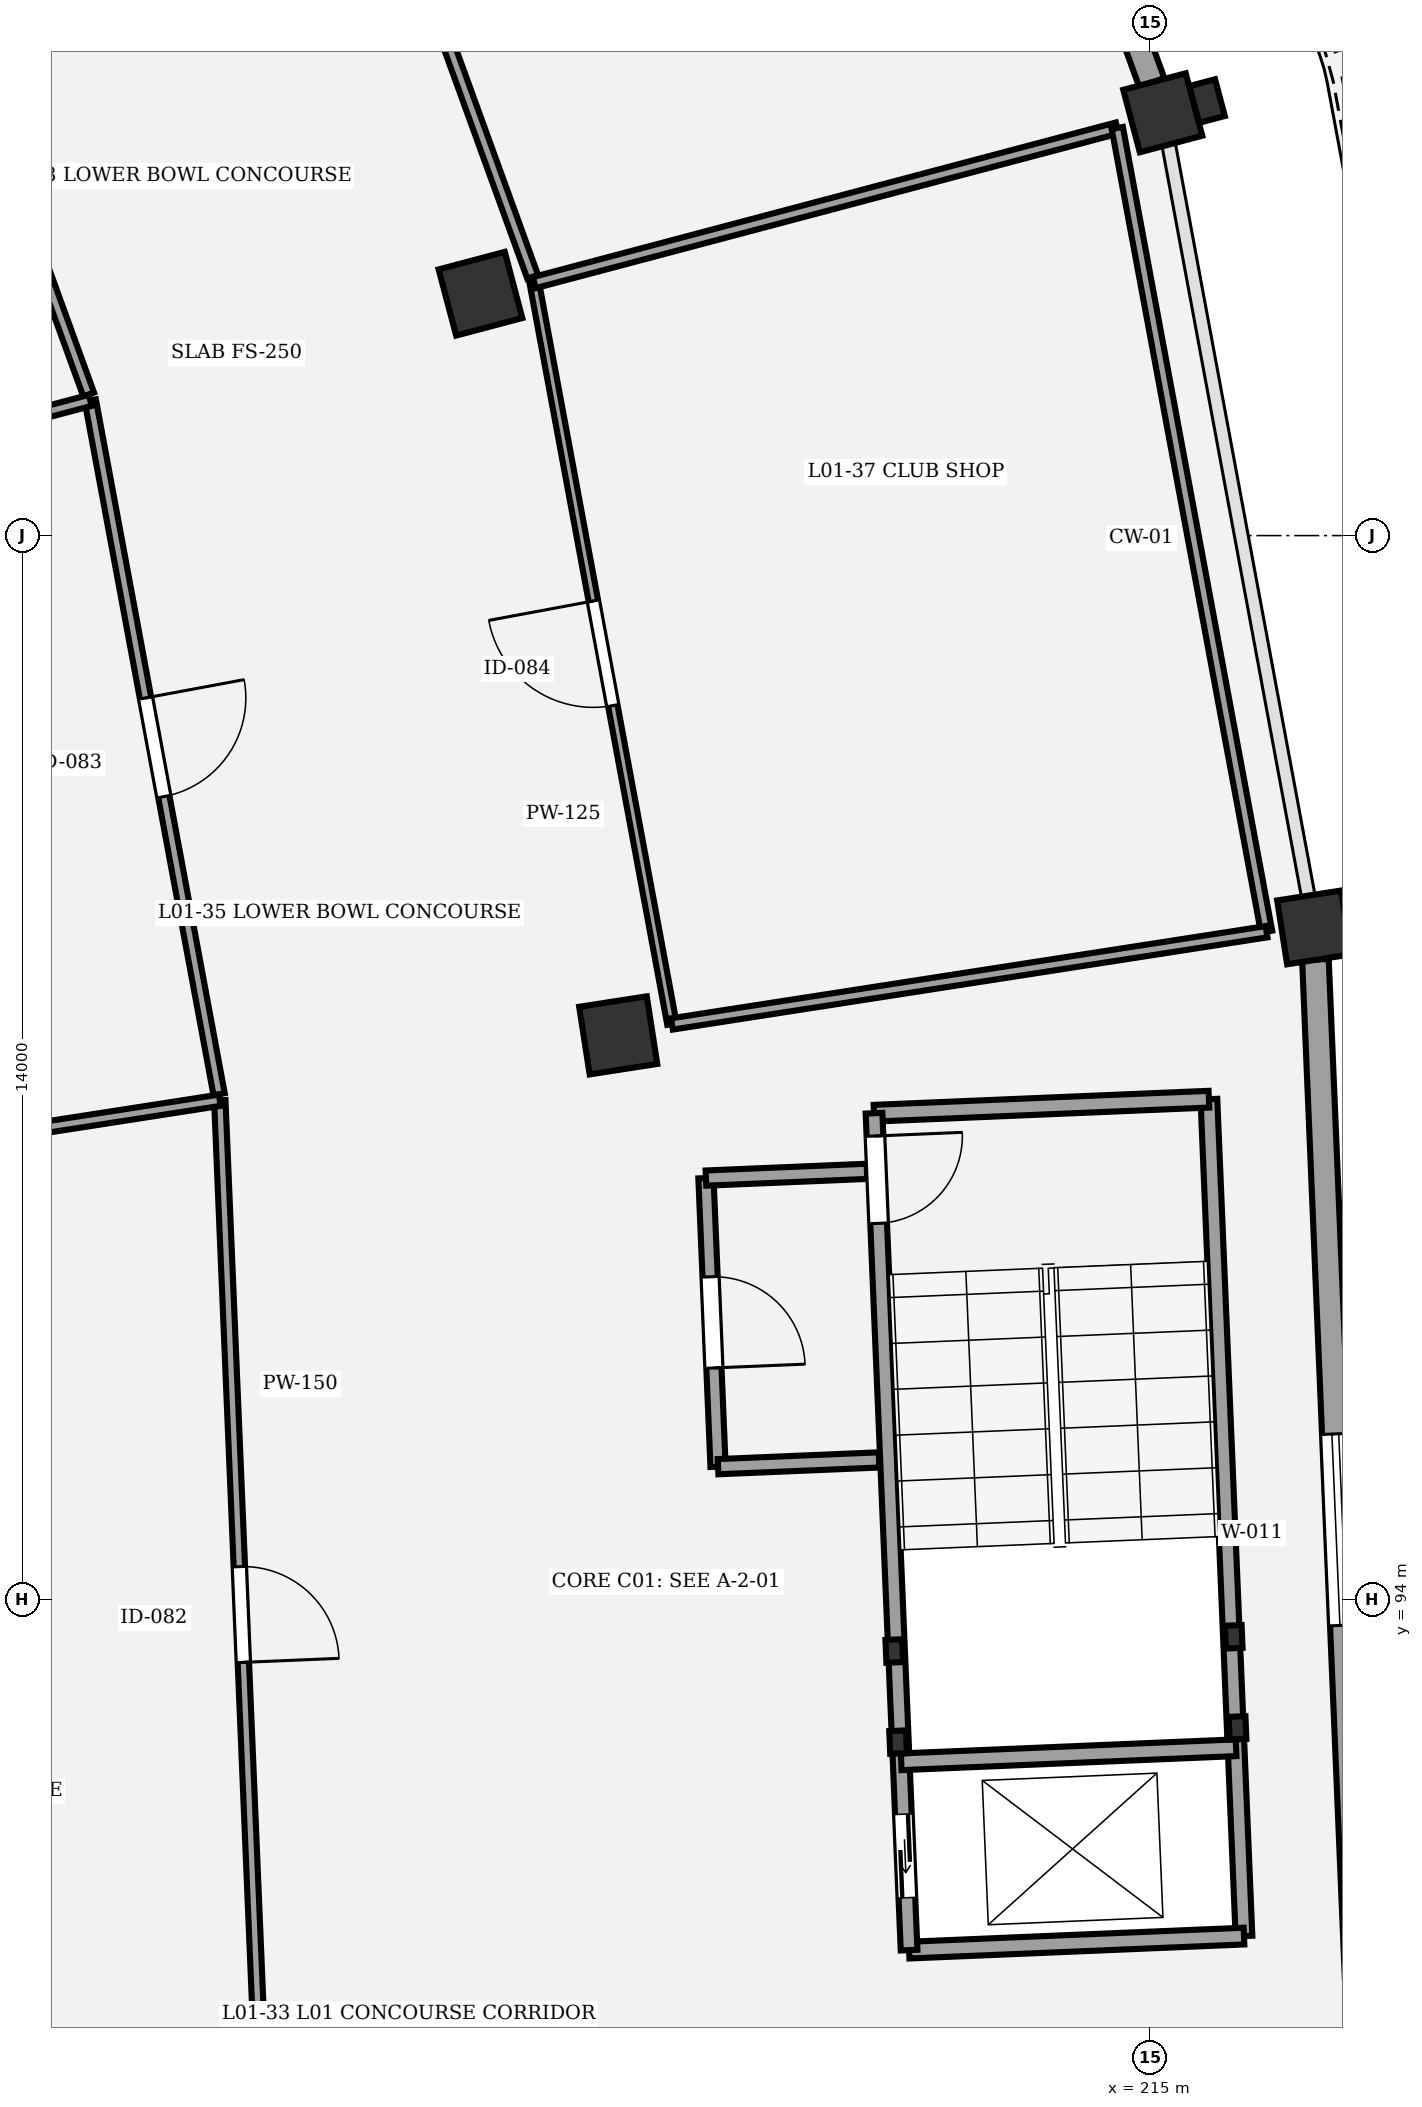
"""IFC4 building model, lengths in metres.
Left out: names, types, materials, properties, quantities, classifications, styles, units other than length and angle.
Written with IfcOpenShell. Run it as: python <this file> out.ifc"""

import sys

from ifc_helpers import new_model, si_unit, direction, frame, frame_2d, origin, origin_2d, place, context, subcontext, project, spatial, rectangle, extrude, element, fill, save


model = new_model("IFC4")
c1 = context("Model", 3, precision=1e-05, world=origin(), true_north=direction((0.0, 1.0)))
c2 = subcontext(c1, "Body", "Model", "MODEL_VIEW")
j1 = project(units=[si_unit("LENGTHUNIT", "METRE"), si_unit("PLANEANGLEUNIT", "RADIAN")], contexts=[c1])
p1 = place(None, origin())
s1 = spatial("IfcSite", under=j1, at=p1, CompositionType="ELEMENT")
p2 = place(p1, origin())
s2 = spatial("IfcBuilding", under=s1, at=p2, CompositionType="ELEMENT")
p3 = place(p2, frame((0.0, 0.0, 5.4)))
s3 = spatial("IfcBuildingStorey", under=s2, at=p3, CompositionType="ELEMENT", Elevation=5.4)
p4 = place(p3, frame((208.0, 101.425, 0.0), z_axis=(0.0, 0.0, 1.0), x_axis=(0.98817491911, 0.153330783737, 0.0)))
e1 = element("IfcColumn", 1, at=p4, inside=s3, PredefinedType="COLUMN", context=c2, shape_type="SweptSolid", body=[
    extrude(rectangle(XDim=0.9, YDim=0.9, at=origin_2d()), origin(), (0.0, 0.0, 1.0), 4.8),
])
p5 = place(p3, frame((217.156, 102.845, 0.0), z_axis=(0.0, 0.0, 1.0), x_axis=(0.98817491911, 0.153330783737, 0.0)))
e2 = element("IfcColumn", 2, at=p5, inside=s3, PredefinedType="COLUMN", context=c2, shape_type="SweptSolid", body=[
    extrude(rectangle(XDim=0.85, YDim=0.85, at=origin_2d()), origin(), (0.0, 0.0, 1.0), 4.8),
])
p6 = place(p3, frame((206.188, 111.182, 0.0), z_axis=(0.0, 0.0, 1.0), x_axis=(0.966600102017, 0.256289373133, 0.0)))
e3 = element("IfcColumn", 3, at=p6, inside=s3, PredefinedType="COLUMN", context=c2, shape_type="SweptSolid", body=[
    extrude(rectangle(XDim=0.9, YDim=0.9, at=origin_2d()), origin(), (0.0, 0.0, 1.0), 4.8),
])
p7 = place(p3, frame((215.165, 113.562, 0.0), z_axis=(0.0, 0.0, 1.0), x_axis=(0.966600102017, 0.256289373133, 0.0)))
e4 = element("IfcColumn", 4, at=p7, inside=s3, PredefinedType="COLUMN", context=c2, shape_type="SweptSolid", body=[
    extrude(rectangle(XDim=0.85, YDim=0.85, at=origin_2d()), origin(), (0.0, 0.0, 1.0), 4.8),
])
p8 = place(p3, frame((215.748, 113.717, 0.0), z_axis=(0.0, 0.0, 1.0), x_axis=(-0.256289373133, 0.966600102017, 0.0)))
e5 = element("IfcColumn", 5, at=p8, inside=s3, PredefinedType="PILASTER", context=c2, shape_type="SweptSolid", body=[
    extrude(rectangle(XDim=0.5, YDim=0.35, at=origin_2d()), origin(), (0.0, 0.0, 1.0), 4.8),
])
p9 = place(p3, frame((217.802, 87.423, 0.0), z_axis=(0.0, 0.0, 1.0), x_axis=(-0.041907194538, 0.999121507649, 0.0)))
e6 = element("IfcWall", 6, at=p9, inside=s3, PredefinedType="STANDARD", context=c2, shape_type="SweptSolid", body=[
    extrude(rectangle(XDim=15.013, YDim=0.35, at=frame_2d((7.506, 0.0))), origin(), (0.0, 0.0, 1.0), 3.57),
])
p10 = place(p9, frame((6.247, 0.0, 0.9)))
e7 = element("IfcOpeningElement", 7, at=p10, cuts=e6, PredefinedType="OPENING", context=c2, shape_type="SweptSolid", body=[
    extrude(rectangle(XDim=2.52, YDim=1.55, at=frame_2d((1.26, 0.775))), frame((0.0, 0.185, 0.0), z_axis=(0.0, -1.0, 0.0), x_axis=(1.0, 0.0, 0.0)), (0.0, 0.0, 1.0), 0.37),
])
p11 = place(p3, frame((212.0, 122.285, 0.0), z_axis=(0.0, 0.0, 1.0), x_axis=(0.341014666885, -0.940057975324, 0.0)))
e8 = element("IfcWall", 8, at=p11, inside=s3, PredefinedType="STANDARD", context=c2, shape_type="SweptSolid", body=[
    extrude(rectangle(XDim=8.855, YDim=0.35, at=frame_2d((4.428, 0.0))), origin(), (0.0, 0.0, 1.0), 3.57),
])
p12 = place(p11, frame((3.528, 0.0, 0.0)))
e9 = element("IfcOpeningElement", 9, at=p12, cuts=e8, PredefinedType="OPENING", context=c2, shape_type="SweptSolid", body=[
    extrude(rectangle(XDim=1.8, YDim=2.4, at=frame_2d((0.9, 1.2))), frame((0.0, 0.185, 0.0), z_axis=(0.0, -1.0, 0.0), x_axis=(1.0, 0.0, 0.0)), (0.0, 0.0, 1.0), 0.37),
])
for number, where, z_axis, x_axis in (
    (10, (211.632, 93.325, 0.0), (0.0, 0.0, 1.0), (0.042, -0.999, 0.0)),
    (11, (211.682, 92.126, 0.0), (0.0, 0.0, 1.0), (0.042, -0.999, 0.0)),
    (12, (216.148, 92.314, 0.0), (0.0, 0.0, 1.0), (0.042, -0.999, 0.0)),
    (13, (216.098, 93.513, 0.0), (0.0, 0.0, 1.0), (0.042, -0.999, 0.0)),
):
    element("IfcColumn", number, at=place(p3, frame(where, z_axis=z_axis, x_axis=x_axis)), inside=s3, PredefinedType="COLUMN", context=c2, shape_type="SweptSolid", body=[
        extrude(rectangle(XDim=0.3, YDim=0.22, at=origin_2d()), origin(), (0.0, 0.0, 1.0), 4.8),
    ])
p13 = place(p3, frame((215.772, 100.585, 0.0), z_axis=(0.0, 0.0, 1.0), x_axis=(0.041871977473, -0.999122984173, 0.0)))
e14 = element("IfcWall", 14, at=p13, inside=s3, PredefinedType="SHEAR", context=c2, shape_type="SweptSolid", body=[
    extrude(rectangle(XDim=11.02, YDim=0.22, at=frame_2d((5.51, 0.0))), origin(), (0.0, 0.0, 1.0), 4.55),
])
for number, where, z_axis, x_axis in (
    (15, (211.365, 100.4, 0.0), (0.0, 0.0, 1.0), (0.999, 0.042, 0.0)),
    (16, (211.827, 89.39, 0.0), (0.0, 0.0, 1.0), (0.999, 0.042, 0.0)),
):
    element("IfcWall", number, at=place(p3, frame(where, z_axis=z_axis, x_axis=x_axis)), inside=s3, PredefinedType="SHEAR", context=c2, shape_type="SweptSolid", body=[
        extrude(rectangle(XDim=4.41, YDim=0.22, at=frame_2d((2.205, 0.0))), origin(), (0.0, 0.0, 1.0), 4.55),
    ])
p14 = place(p3, frame((211.365, 100.4, 0.0), z_axis=(0.0, 0.0, 1.0), x_axis=(0.041871977473, -0.999122984173, 0.0)))
e17 = element("IfcWall", 17, at=p14, inside=s3, PredefinedType="SHEAR", context=c2, shape_type="SweptSolid", body=[
    extrude(rectangle(XDim=11.02, YDim=0.22, at=frame_2d((5.51, 0.0))), origin(), (0.0, 0.0, 1.0), 4.55),
])
p15 = place(p14, frame((0.3, 0.0, 0.0)))
e18 = element("IfcOpeningElement", 18, at=p15, cuts=e17, PredefinedType="OPENING", context=c2, shape_type="SweptSolid", body=[
    extrude(rectangle(XDim=1.15, YDim=2.15, at=frame_2d((0.575, 1.075))), frame((0.0, 0.12, 0.0), z_axis=(0.0, -1.0, 0.0), x_axis=(1.0, 0.0, 0.0)), (0.0, 0.0, 1.0), 0.24),
])
p16 = place(p14, frame((9.23, 0.0, 0.0)))
e19 = element("IfcOpeningElement", 19, at=p16, cuts=e17, PredefinedType="OPENING", context=c2, shape_type="SweptSolid", body=[
    extrude(rectangle(XDim=1.1, YDim=2.15, at=frame_2d((0.55, 1.075))), frame((0.0, 0.12, 0.0), z_axis=(0.0, -1.0, 0.0), x_axis=(1.0, 0.0, 0.0)), (0.0, 0.0, 1.0), 0.24),
])
p17 = place(p3, frame((211.723, 91.868, 0.0), z_axis=(0.0, 0.0, 1.0), x_axis=(0.999121521721, 0.041906859039, 0.0)))
e20 = element("IfcWall", 20, at=p17, inside=s3, PredefinedType="SHEAR", context=c2, shape_type="SweptSolid", body=[
    extrude(rectangle(XDim=4.41, YDim=0.22, at=frame_2d((2.205, 0.0))), origin(), (0.0, 0.0, 1.0), 4.55),
])
p18 = place(p3, frame((209.154, 99.547, 0.0), z_axis=(0.0, 0.0, 1.0), x_axis=(0.041889762691, -0.999122238658, 0.0)))
e21 = element("IfcWall", 21, at=p18, inside=s3, PredefinedType="PARTITIONING", context=c2, shape_type="SweptSolid", body=[
    extrude(rectangle(XDim=3.8, YDim=0.2, at=frame_2d((1.9, 0.0))), origin(), (0.0, 0.0, 1.0), 3.65),
])
p19 = place(p18, frame((1.3, 0.0, 0.0)))
e22 = element("IfcOpeningElement", 22, at=p19, cuts=e21, PredefinedType="OPENING", context=c2, shape_type="SweptSolid", body=[
    extrude(rectangle(XDim=1.2, YDim=2.18, at=frame_2d((0.6, 1.09))), frame((0.0, 0.11, 0.0), z_axis=(0.0, -1.0, 0.0), x_axis=(1.0, 0.0, 0.0)), (0.0, 0.0, 1.0), 0.22),
])
for number, where, z_axis, x_axis in (
    (23, (209.154, 99.547, 0.0), (0.0, 0.0, 1.0), (0.999, 0.042, 0.0)),
    (24, (209.313, 95.75, 0.0), (0.0, 0.0, 1.0), (0.999, 0.042, 0.0)),
):
    element("IfcWall", number, at=place(p3, frame(where, z_axis=z_axis, x_axis=x_axis)), inside=s3, PredefinedType="PARTITIONING", context=c2, shape_type="SweptSolid", body=[
        extrude(rectangle(XDim=2.12, YDim=0.2, at=frame_2d((1.06, 0.0))), origin(), (0.0, 0.0, 1.0), 3.65),
    ])
p20 = place(p3, frame((202.758, 100.571, 0.0), z_axis=(0.0, 0.0, 1.0), x_axis=(0.041894479342, -0.999122040894, 0.0)))
e25 = element("IfcWall", 25, at=p20, inside=s3, PredefinedType="PARTITIONING", context=c2, shape_type="SweptSolid", body=[
    extrude(rectangle(XDim=13.543, YDim=0.15, at=frame_2d((6.771, 0.0))), origin(), (0.0, 0.0, 1.0), 3.55),
])
p21 = place(p20, frame((6.142, 0.0, 0.0)))
e26 = element("IfcOpeningElement", 26, at=p21, cuts=e25, PredefinedType="OPENING", context=c2, shape_type="SweptSolid", body=[
    extrude(rectangle(XDim=1.26, YDim=2.1, at=frame_2d((0.63, 1.05))), frame((0.0, 0.085, 0.0), z_axis=(0.0, -1.0, 0.0), x_axis=(1.0, 0.0, 0.0)), (0.0, 0.0, 1.0), 0.17),
])
p22 = place(p3, frame((201.053, 109.779, 0.0), z_axis=(0.0, 0.0, 1.0), x_axis=(0.182600545941, -0.983187184936, 0.0)))
e27 = element("IfcWall", 27, at=p22, inside=s3, PredefinedType="PARTITIONING", context=c2, shape_type="SweptSolid", body=[
    extrude(rectangle(XDim=9.284, YDim=0.15, at=frame_2d((4.642, 0.0))), origin(), (0.0, 0.0, 1.0), 3.55),
])
p23 = place(p22, frame((3.982, 0.0, 0.0)))
e28 = element("IfcOpeningElement", 28, at=p23, cuts=e27, PredefinedType="OPENING", context=c2, shape_type="SweptSolid", body=[
    extrude(rectangle(XDim=1.32, YDim=2.1, at=frame_2d((0.66, 1.05))), frame((0.0, 0.085, 0.0), z_axis=(0.0, -1.0, 0.0), x_axis=(1.0, 0.0, 0.0)), (0.0, 0.0, 1.0), 0.17),
])
p24 = place(p3, frame((208.707, 101.575, 0.0), z_axis=(0.0, 0.0, 1.0), x_axis=(-0.182618024057, 0.983183938686, 0.0)))
e29 = element("IfcWall", 29, at=p24, inside=s3, PredefinedType="PARTITIONING", context=c2, shape_type="SweptSolid", body=[
    extrude(rectangle(XDim=9.92, YDim=0.125, at=frame_2d((4.96, 0.0))), origin(), (0.0, 0.0, 1.0), 3.55),
])
p25 = place(p24, frame((4.26, 0.0, 0.0)))
e30 = element("IfcOpeningElement", 30, at=p25, cuts=e29, PredefinedType="OPENING", context=c2, shape_type="SweptSolid", body=[
    extrude(rectangle(XDim=1.4, YDim=2.1, at=frame_2d((0.7, 1.05))), frame((0.0, 0.073, 0.0), z_axis=(0.0, -1.0, 0.0), x_axis=(1.0, 0.0, 0.0)), (0.0, 0.0, 1.0), 0.145),
])
p26 = place(p3, frame((198.218, 117.615, 0.0), z_axis=(0.0, 0.0, 1.0), x_axis=(0.341044733968, -0.940047067669, 0.0)))
e31 = element("IfcWall", 31, at=p26, inside=s3, PredefinedType="PARTITIONING", context=c2, shape_type="SweptSolid", body=[
    extrude(rectangle(XDim=8.254, YDim=0.15, at=frame_2d((4.127, 0.0))), origin(), (0.0, 0.0, 1.0), 3.55),
])
p27 = place(p26, frame((3.677, 0.0, 0.0)))
e32 = element("IfcOpeningElement", 32, at=p27, cuts=e31, PredefinedType="OPENING", context=c2, shape_type="SweptSolid", body=[
    extrude(rectangle(XDim=0.9, YDim=2.2, at=frame_2d((0.45, 1.1))), frame((0.0, 0.085, 0.0), z_axis=(0.0, -1.0, 0.0), x_axis=(1.0, 0.0, 0.0)), (0.0, 0.0, 1.0), 0.17),
])
p28 = place(p3, frame((206.874, 111.405, 0.0), z_axis=(0.0, 0.0, 1.0), x_axis=(-0.341031741571, 0.940051781149, 0.0)))
e33 = element("IfcWall", 33, at=p28, inside=s3, PredefinedType="PARTITIONING", context=c2, shape_type="SweptSolid", body=[
    extrude(rectangle(XDim=8.82, YDim=0.15, at=frame_2d((4.41, 0.0))), origin(), (0.0, 0.0, 1.0), 3.55),
])
p29 = place(p28, frame((3.94, 0.0, 0.0)))
e34 = element("IfcOpeningElement", 34, at=p29, cuts=e33, PredefinedType="OPENING", context=c2, shape_type="SweptSolid", body=[
    extrude(rectangle(XDim=0.94, YDim=2.2, at=frame_2d((0.47, 1.1))), frame((0.0, 0.085, 0.0), z_axis=(0.0, -1.0, 0.0), x_axis=(1.0, 0.0, 0.0)), (0.0, 0.0, 1.0), 0.17),
])
p30 = place(p3, frame((193.682, 99.164, 0.0), z_axis=(0.0, 0.0, 1.0), x_axis=(0.988188135357, 0.153245584407, 0.0)))
e35 = element("IfcWall", 35, at=p30, inside=s3, PredefinedType="PARTITIONING", context=c2, shape_type="SweptSolid", body=[
    extrude(rectangle(XDim=9.184, YDim=0.15, at=frame_2d((4.592, 0.0))), origin(), (0.0, 0.0, 1.0), 3.55),
])
p31 = place(p3, frame((192.154, 107.419, 0.0), z_axis=(0.0, 0.0, 1.0), x_axis=(0.96658744027, 0.256337122383, 0.0)))
e36 = element("IfcWall", 36, at=p31, inside=s3, PredefinedType="PARTITIONING", context=c2, shape_type="SweptSolid", body=[
    extrude(rectangle(XDim=9.207, YDim=0.15, at=frame_2d((4.604, 0.0))), origin(), (0.0, 0.0, 1.0), 3.55),
])
p32 = place(p3, frame((206.895, 111.328, 0.0), z_axis=(0.0, 0.0, 1.0), x_axis=(0.966593450181, 0.25631445934, 0.0)))
e37 = element("IfcWall", 37, at=p32, inside=s3, PredefinedType="PARTITIONING", context=c2, shape_type="SweptSolid", body=[
    extrude(rectangle(XDim=7.936, YDim=0.15, at=frame_2d((3.968, 0.0))), origin(), (0.0, 0.0, 1.0), 3.55),
])
p33 = place(p3, frame((214.566, 113.362, 0.0), z_axis=(0.0, 0.0, 1.0), x_axis=(0.182607868301, -0.983185824976, 0.0)))
e38 = element("IfcWall", 38, at=p33, inside=s3, PredefinedType="PARTITIONING", context=c2, shape_type="SweptSolid", body=[
    extrude(rectangle(XDim=10.755, YDim=0.15, at=frame_2d((5.377, 0.0))), origin(), (0.0, 0.0, 1.0), 3.55),
])
p34 = place(p3, frame((216.53, 102.789, 0.0), z_axis=(0.0, 0.0, 1.0), x_axis=(-0.988185582016, -0.153262048451, 0.0)))
e39 = element("IfcWall", 39, at=p34, inside=s3, PredefinedType="PARTITIONING", context=c2, shape_type="SweptSolid", body=[
    extrude(rectangle(XDim=7.917, YDim=0.15, at=frame_2d((3.958, 0.0))), origin(), (0.0, 0.0, 1.0), 3.55),
])
p35 = place(p10, origin())
e40 = element("IfcWindow", 40, at=p35, inside=s3, PartitioningType="SINGLE_PANEL", PredefinedType="WINDOW", context=c2, shape_type="SweptSolid", body=[
    extrude(rectangle(XDim=2.52, YDim=1.55, at=frame_2d((1.26, 0.775))), frame((0.0, 0.03, 0.0), z_axis=(0.0, -1.0, 0.0), x_axis=(1.0, 0.0, 0.0)), (0.0, 0.0, 1.0), 0.06),
])
fill(e7, e40)
p36 = place(p15, origin())
e41 = element("IfcDoor", 41, at=p36, inside=s3, OperationType="SINGLE_SWING_LEFT", PredefinedType="DOOR", context=c2, shape_type="SweptSolid", body=[
    extrude(rectangle(XDim=1.15, YDim=2.15, at=frame_2d((0.575, 1.075))), frame((0.0, 0.025, 0.0), z_axis=(0.0, -1.0, 0.0), x_axis=(1.0, 0.0, 0.0)), (0.0, 0.0, 1.0), 0.05),
])
fill(e18, e41)
p37 = place(p16, origin())
e42 = element("IfcDoor", 42, at=p37, inside=s3, OperationType="DOUBLE_DOOR_SLIDING", PredefinedType="DOOR", context=c2, shape_type="SweptSolid", body=[
    extrude(rectangle(XDim=1.1, YDim=2.15, at=frame_2d((0.55, 1.075))), frame((0.0, 0.025, 0.0), z_axis=(0.0, -1.0, 0.0), x_axis=(1.0, 0.0, 0.0)), (0.0, 0.0, 1.0), 0.05),
])
fill(e19, e42)
p38 = place(p19, origin())
e43 = element("IfcDoor", 43, at=p38, inside=s3, OperationType="SINGLE_SWING_RIGHT", PredefinedType="DOOR", context=c2, shape_type="SweptSolid", body=[
    extrude(rectangle(XDim=1.2, YDim=2.18, at=frame_2d((0.6, 1.09))), frame((0.0, 0.025, 0.0), z_axis=(0.0, -1.0, 0.0), x_axis=(1.0, 0.0, 0.0)), (0.0, 0.0, 1.0), 0.05),
])
fill(e22, e43)
p39 = place(p21, origin())
e44 = element("IfcDoor", 44, at=p39, inside=s3, OperationType="SINGLE_SWING_RIGHT", PredefinedType="DOOR", context=c2, shape_type="SweptSolid", body=[
    extrude(rectangle(XDim=1.26, YDim=2.1, at=frame_2d((0.63, 1.05))), frame((0.0, 0.025, 0.0), z_axis=(0.0, -1.0, 0.0), x_axis=(1.0, 0.0, 0.0)), (0.0, 0.0, 1.0), 0.05),
])
fill(e26, e44)
p40 = place(p23, origin())
e45 = element("IfcDoor", 45, at=p40, inside=s3, OperationType="SINGLE_SWING_LEFT", PredefinedType="DOOR", context=c2, shape_type="SweptSolid", body=[
    extrude(rectangle(XDim=1.32, YDim=2.1, at=frame_2d((0.66, 1.05))), frame((0.0, 0.025, 0.0), z_axis=(0.0, -1.0, 0.0), x_axis=(1.0, 0.0, 0.0)), (0.0, 0.0, 1.0), 0.05),
])
fill(e28, e45)
p41 = place(p25, origin())
e46 = element("IfcDoor", 46, at=p41, inside=s3, OperationType="SINGLE_SWING_RIGHT", PredefinedType="DOOR", context=c2, shape_type="SweptSolid", body=[
    extrude(rectangle(XDim=1.4, YDim=2.1, at=frame_2d((0.7, 1.05))), frame((0.0, 0.025, 0.0), z_axis=(0.0, -1.0, 0.0), x_axis=(1.0, 0.0, 0.0)), (0.0, 0.0, 1.0), 0.05),
])
fill(e30, e46)
save(model, sys.argv[1])
